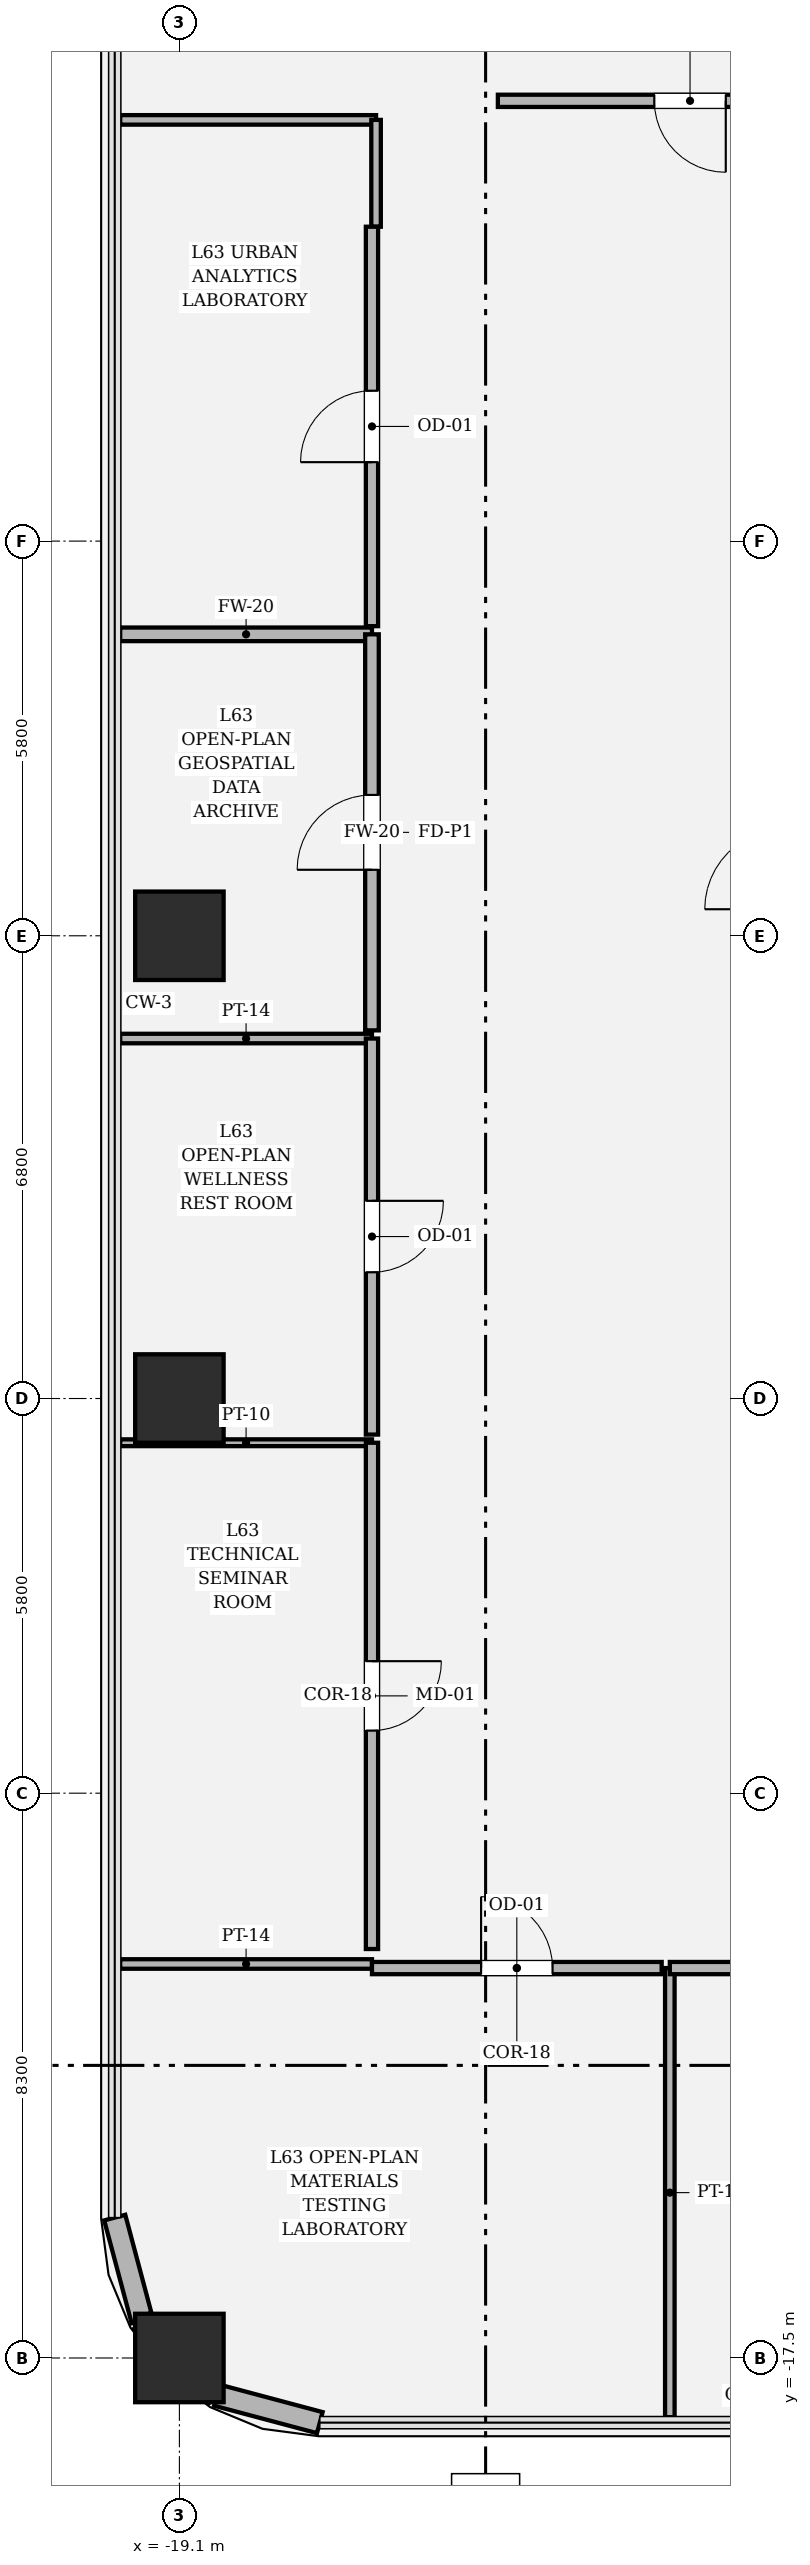
"""IFC4 building model, lengths in metres.
Left out: names, types, materials, properties, quantities, classifications, styles, units other than length and angle.
Written with IfcOpenShell. Run it as: python <this file> out.ifc"""

import sys

from ifc_helpers import new_model, si_unit, direction, frame, frame_2d, origin, origin_2d, place, context, subcontext, project, spatial, rectangle, hollow_rectangle, extrude, element, fill, save


model = new_model("IFC4")
c1 = context("Model", 3, precision=1e-05, world=origin(), true_north=direction((0.0, 1.0)))
c2 = subcontext(c1, "Body", "Model", "MODEL_VIEW")
j1 = project(units=[si_unit("LENGTHUNIT", "METRE"), si_unit("PLANEANGLEUNIT", "RADIAN")], contexts=[c1])
p1 = place(None, origin())
s1 = spatial("IfcSite", under=j1, at=p1, CompositionType="ELEMENT")
p2 = place(p1, origin())
s2 = spatial("IfcBuilding", under=s1, at=p2, CompositionType="ELEMENT")
p3 = place(p2, frame((0.0, 0.0, 267.6)))
s3 = spatial("IfcBuildingStorey", under=s2, at=p3, CompositionType="ELEMENT", Elevation=267.6)
for number, where, z_axis, x_axis in (
    (1, (-19.1, -17.5, 0.0), (0.0, 0.0, 1.0), (1.0, 0.0, 0.0)),
    (2, (-19.1, 3.4, 0.0), (0.0, 0.0, 1.0), (1.0, 0.0, 0.0)),
    (3, (-19.1, -3.4, 0.0), (0.0, 0.0, 1.0), (1.0, 0.0, 0.0)),
):
    element("IfcColumn", number, at=place(p3, frame(where, z_axis=z_axis, x_axis=x_axis)), inside=s3, PredefinedType="COLUMN", context=c2, shape_type="SweptSolid", body=[
        extrude(hollow_rectangle(XDim=1.3, YDim=1.3, WallThickness=0.038, at=origin_2d()), origin(), (0.0, 0.0, 1.0), 4.05),
    ])
p4 = place(p3, frame((-20.05, -15.437, 0.0), z_axis=(0.0, 0.0, 1.0), x_axis=(0.257847112249, -0.966185730957, 0.0)))
e4 = element("IfcWall", 4, at=p4, inside=s3, PredefinedType="SOLIDWALL", context=c2, shape_type="SweptSolid", body=[
    extrude(rectangle(XDim=1.565, YDim=0.32, at=frame_2d((0.783, 0.0))), origin(), (0.0, 0.0, 1.0), 3.85),
])
p5 = place(p3, frame((-19.646, -16.949, 0.0), z_axis=(0.0, 0.0, 1.0), x_axis=(0.707106781187, -0.707106781187, 0.0)))
e5 = element("IfcWall", 5, at=p5, inside=s3, PredefinedType="SOLIDWALL", context=c2, shape_type="SweptSolid", body=[
    extrude(rectangle(XDim=1.552, YDim=0.32, at=frame_2d((0.776, 0.0))), origin(), (0.0, 0.0, 1.0), 3.244),
])
p6 = place(p3, frame((-18.549, -18.047, 0.0), z_axis=(0.0, 0.0, 1.0), x_axis=(0.966224582397, -0.257701486942, 0.0)))
e6 = element("IfcWall", 6, at=p6, inside=s3, PredefinedType="SOLIDWALL", context=c2, shape_type="SweptSolid", body=[
    extrude(rectangle(XDim=1.565, YDim=0.32, at=frame_2d((0.783, 0.0))), origin(), (0.0, 0.0, 1.0), 3.85),
])
p7 = place(p3, frame((-11.893, -18.37, 0.0), z_axis=(0.0, 0.0, 1.0), x_axis=(0.0, 1.0, 0.0)))
e7 = element("IfcWall", 7, at=p7, inside=s3, PredefinedType="PARTITIONING", context=c2, shape_type="SweptSolid", body=[
    extrude(rectangle(XDim=6.6, YDim=0.14, at=frame_2d((3.3, 0.0))), origin(), (0.0, 0.0, 1.0), 3.244),
])
p8 = place(p3, frame((-11.893, -11.77, 0.0), z_axis=(0.0, 0.0, 1.0), x_axis=(1.0, 0.0, 0.0)))
e8 = element("IfcWall", 8, at=p8, inside=s3, PredefinedType="PARTITIONING", context=c2, shape_type="SweptSolid", body=[
    extrude(rectangle(XDim=10.066, YDim=0.18, at=frame_2d((5.033, 0.0))), origin(), (0.0, 0.0, 1.0), 3.244),
])
p9 = place(p8, frame((4.508, 0.0, 0.0)))
e9 = element("IfcOpeningElement", 9, at=p9, cuts=e8, PredefinedType="OPENING", context=c2, shape_type="SweptSolid", body=[
    extrude(rectangle(XDim=1.05, YDim=2.2, at=frame_2d((0.525, 1.1))), frame((0.0, 0.1, 0.0), z_axis=(0.0, -1.0, 0.0), x_axis=(1.0, 0.0, 0.0)), (0.0, 0.0, 1.0), 0.2),
])
p10 = place(p3, frame((-19.97, -11.71, 0.0), z_axis=(0.0, 0.0, 1.0), x_axis=(1.0, 0.0, 0.0)))
e10 = element("IfcWall", 10, at=p10, inside=s3, PredefinedType="PARTITIONING", context=c2, shape_type="SweptSolid", body=[
    extrude(rectangle(XDim=3.7, YDim=0.14, at=frame_2d((1.85, 0.0))), origin(), (0.0, 0.0, 1.0), 3.244),
])
p11 = place(p3, frame((-16.27, -11.77, 0.0), z_axis=(0.0, 0.0, 1.0), x_axis=(1.0, 0.0, 0.0)))
e11 = element("IfcWall", 11, at=p11, inside=s3, PredefinedType="PARTITIONING", context=c2, shape_type="SweptSolid", body=[
    extrude(rectangle(XDim=4.257, YDim=0.18, at=frame_2d((2.128, 0.0))), origin(), (0.0, 0.0, 1.0), 3.484),
])
p12 = place(p11, frame((1.604, 0.0, 0.0)))
e12 = element("IfcOpeningElement", 12, at=p12, cuts=e11, PredefinedType="OPENING", context=c2, shape_type="SweptSolid", body=[
    extrude(rectangle(XDim=1.05, YDim=2.2, at=frame_2d((0.525, 1.1))), frame((0.0, 0.1, 0.0), z_axis=(0.0, -1.0, 0.0), x_axis=(1.0, 0.0, 0.0)), (0.0, 0.0, 1.0), 0.2),
])
p13 = place(p3, frame((-19.97, -4.05, 0.0), z_axis=(0.0, 0.0, 1.0), x_axis=(1.0, 0.0, 0.0)))
e13 = element("IfcWall", 13, at=p13, inside=s3, PredefinedType="PARTITIONING", context=c2, shape_type="SweptSolid", body=[
    extrude(rectangle(XDim=3.7, YDim=0.1, at=frame_2d((1.85, 0.0))), origin(), (0.0, 0.0, 1.0), 3.244),
])
p14 = place(p3, frame((-16.27, -4.05, 0.0), z_axis=(0.0, 0.0, 1.0), x_axis=(0.0, -1.0, 0.0)))
e14 = element("IfcWall", 14, at=p14, inside=s3, PredefinedType="PARTITIONING", context=c2, shape_type="SweptSolid", body=[
    extrude(rectangle(XDim=7.44, YDim=0.18, at=frame_2d((3.72, 0.0))), origin(), (0.0, 0.0, 1.0), 3.244),
])
p15 = place(p14, frame((3.21, 0.0, 0.0)))
e15 = element("IfcOpeningElement", 15, at=p15, cuts=e14, PredefinedType="OPENING", context=c2, shape_type="SweptSolid", body=[
    extrude(rectangle(XDim=1.02, YDim=2.2, at=frame_2d((0.51, 1.1))), frame((0.0, 0.1, 0.0), z_axis=(0.0, -1.0, 0.0), x_axis=(1.0, 0.0, 0.0)), (0.0, 0.0, 1.0), 0.2),
])
p16 = place(p3, frame((-19.97, 1.89, 0.0), z_axis=(0.0, 0.0, 1.0), x_axis=(1.0, 0.0, 0.0)))
e16 = element("IfcWall", 16, at=p16, inside=s3, PredefinedType="PARTITIONING", context=c2, shape_type="SweptSolid", body=[
    extrude(rectangle(XDim=3.7, YDim=0.14, at=frame_2d((1.85, 0.0))), origin(), (0.0, 0.0, 1.0), 3.244),
])
p17 = place(p3, frame((-16.27, 1.89, 0.0), z_axis=(0.0, 0.0, 1.0), x_axis=(0.0, -1.0, 0.0)))
e17 = element("IfcWall", 17, at=p17, inside=s3, PredefinedType="PARTITIONING", context=c2, shape_type="SweptSolid", body=[
    extrude(rectangle(XDim=5.82, YDim=0.18, at=frame_2d((2.91, 0.0))), origin(), (0.0, 0.0, 1.0), 3.244),
])
p18 = place(p17, frame((2.385, 0.0, 0.0)))
e18 = element("IfcOpeningElement", 18, at=p18, cuts=e17, PredefinedType="OPENING", context=c2, shape_type="SweptSolid", body=[
    extrude(rectangle(XDim=1.05, YDim=2.2, at=frame_2d((0.525, 1.1))), frame((0.0, 0.1, 0.0), z_axis=(0.0, -1.0, 0.0), x_axis=(1.0, 0.0, 0.0)), (0.0, 0.0, 1.0), 0.2),
])
p19 = place(p3, frame((-19.97, 7.83, 0.0), z_axis=(0.0, 0.0, 1.0), x_axis=(1.0, 0.0, 0.0)))
e19 = element("IfcWall", 19, at=p19, inside=s3, PredefinedType="SOLIDWALL", context=c2, shape_type="SweptSolid", body=[
    extrude(rectangle(XDim=3.7, YDim=0.2, at=frame_2d((1.85, 0.0))), origin(), (0.0, 0.0, 1.0), 3.244),
])
p20 = place(p3, frame((-16.27, 7.83, 0.0), z_axis=(0.0, 0.0, 1.0), x_axis=(0.0, -1.0, 0.0)))
e20 = element("IfcWall", 20, at=p20, inside=s3, PredefinedType="SOLIDWALL", context=c2, shape_type="SweptSolid", body=[
    extrude(rectangle(XDim=5.82, YDim=0.2, at=frame_2d((2.91, 0.0))), origin(), (0.0, 0.0, 1.0), 3.244),
])
p21 = place(p20, frame((2.36, 0.0, 0.0)))
e21 = element("IfcOpeningElement", 21, at=p21, cuts=e20, PredefinedType="OPENING", context=c2, shape_type="SweptSolid", body=[
    extrude(rectangle(XDim=1.1, YDim=2.2, at=frame_2d((0.55, 1.1))), frame((0.0, 0.11, 0.0), z_axis=(0.0, -1.0, 0.0), x_axis=(1.0, 0.0, 0.0)), (0.0, 0.0, 1.0), 0.22),
])
p22 = place(p3, frame((-19.97, 15.39, 0.0), z_axis=(0.0, 0.0, 1.0), x_axis=(1.0, 0.0, 0.0)))
e22 = element("IfcWall", 22, at=p22, inside=s3, PredefinedType="PARTITIONING", context=c2, shape_type="SweptSolid", body=[
    extrude(rectangle(XDim=3.76, YDim=0.14, at=frame_2d((1.88, 0.0))), origin(), (0.0, 0.0, 1.0), 3.244),
])
p23 = place(p3, frame((-16.21, 15.39, 0.0), z_axis=(0.0, 0.0, 1.0), x_axis=(0.0, -1.0, 0.0)))
e23 = element("IfcWall", 23, at=p23, inside=s3, PredefinedType="PARTITIONING", context=c2, shape_type="SweptSolid", body=[
    extrude(rectangle(XDim=1.57, YDim=0.14, at=frame_2d((0.785, 0.0))), origin(), (0.0, 0.0, 1.0), 3.85),
])
p24 = place(p3, frame((-16.27, 13.82, 0.0), z_axis=(0.0, 0.0, 1.0), x_axis=(0.0, -1.0, 0.0)))
e24 = element("IfcWall", 24, at=p24, inside=s3, PredefinedType="PARTITIONING", context=c2, shape_type="SweptSolid", body=[
    extrude(rectangle(XDim=5.87, YDim=0.18, at=frame_2d((2.935, 0.0))), origin(), (0.0, 0.0, 1.0), 3.244),
])
p25 = place(p24, frame((2.41, 0.0, 0.0)))
e25 = element("IfcOpeningElement", 25, at=p25, cuts=e24, PredefinedType="OPENING", context=c2, shape_type="SweptSolid", body=[
    extrude(rectangle(XDim=1.05, YDim=2.2, at=frame_2d((0.525, 1.1))), frame((0.0, 0.1, 0.0), z_axis=(0.0, -1.0, 0.0), x_axis=(1.0, 0.0, 0.0)), (0.0, 0.0, 1.0), 0.2),
])
p26 = place(p3, frame((-8.772, 15.67, 0.0), z_axis=(0.0, 0.0, 1.0), x_axis=(-1.0, 0.0, 0.0)))
e26 = element("IfcWall", 26, at=p26, inside=s3, PredefinedType="PARTITIONING", context=c2, shape_type="SweptSolid", body=[
    extrude(rectangle(XDim=5.648, YDim=0.18, at=frame_2d((2.824, 0.0))), origin(), (0.0, 0.0, 1.0), 3.244),
])
p27 = place(p26, frame((2.299, 0.0, 0.0)))
e27 = element("IfcOpeningElement", 27, at=p27, cuts=e26, PredefinedType="OPENING", context=c2, shape_type="SweptSolid", body=[
    extrude(rectangle(XDim=1.05, YDim=2.2, at=frame_2d((0.525, 1.1))), frame((0.0, 0.1, 0.0), z_axis=(0.0, -1.0, 0.0), x_axis=(1.0, 0.0, 0.0)), (0.0, 0.0, 1.0), 0.2),
])
p28 = place(p12, origin())
e28 = element("IfcDoor", 28, at=p28, inside=s3, OperationType="SINGLE_SWING_LEFT", PredefinedType="DOOR", context=c2, shape_type="SweptSolid", body=[
    extrude(rectangle(XDim=1.05, YDim=2.2, at=frame_2d((0.525, 1.1))), frame((0.0, 0.025, 0.0), z_axis=(0.0, -1.0, 0.0), x_axis=(1.0, 0.0, 0.0)), (0.0, 0.0, 1.0), 0.05),
])
fill(e12, e28)
p29 = place(p15, origin())
e29 = element("IfcDoor", 29, at=p29, inside=s3, OperationType="SINGLE_SWING_LEFT", PredefinedType="DOOR", context=c2, shape_type="SweptSolid", body=[
    extrude(rectangle(XDim=1.02, YDim=2.2, at=frame_2d((0.51, 1.1))), frame((0.0, 0.025, 0.0), z_axis=(0.0, -1.0, 0.0), x_axis=(1.0, 0.0, 0.0)), (0.0, 0.0, 1.0), 0.05),
])
fill(e15, e29)
p30 = place(p18, origin())
e30 = element("IfcDoor", 30, at=p30, inside=s3, OperationType="SINGLE_SWING_LEFT", PredefinedType="DOOR", context=c2, shape_type="SweptSolid", body=[
    extrude(rectangle(XDim=1.05, YDim=2.2, at=frame_2d((0.525, 1.1))), frame((0.0, 0.025, 0.0), z_axis=(0.0, -1.0, 0.0), x_axis=(1.0, 0.0, 0.0)), (0.0, 0.0, 1.0), 0.05),
])
fill(e18, e30)
p31 = place(p21, origin())
e31 = element("IfcDoor", 31, at=p31, inside=s3, OperationType="SINGLE_SWING_RIGHT", PredefinedType="DOOR", context=c2, shape_type="SweptSolid", body=[
    extrude(rectangle(XDim=1.1, YDim=2.2, at=frame_2d((0.55, 1.1))), frame((0.0, 0.025, 0.0), z_axis=(0.0, -1.0, 0.0), x_axis=(1.0, 0.0, 0.0)), (0.0, 0.0, 1.0), 0.05),
])
fill(e21, e31)
p32 = place(p25, origin())
e32 = element("IfcDoor", 32, at=p32, inside=s3, OperationType="SINGLE_SWING_RIGHT", PredefinedType="DOOR", context=c2, shape_type="SweptSolid", body=[
    extrude(rectangle(XDim=1.05, YDim=2.2, at=frame_2d((0.525, 1.1))), frame((0.0, 0.025, 0.0), z_axis=(0.0, -1.0, 0.0), x_axis=(1.0, 0.0, 0.0)), (0.0, 0.0, 1.0), 0.05),
])
fill(e25, e32)
p33 = place(p27, origin())
e33 = element("IfcDoor", 33, at=p33, inside=s3, OperationType="SINGLE_SWING_LEFT", PredefinedType="DOOR", context=c2, shape_type="SweptSolid", body=[
    extrude(rectangle(XDim=1.05, YDim=2.2, at=frame_2d((0.525, 1.1))), frame((0.0, 0.025, 0.0), z_axis=(0.0, -1.0, 0.0), x_axis=(1.0, 0.0, 0.0)), (0.0, 0.0, 1.0), 0.05),
])
fill(e27, e33)
save(model, sys.argv[1])
